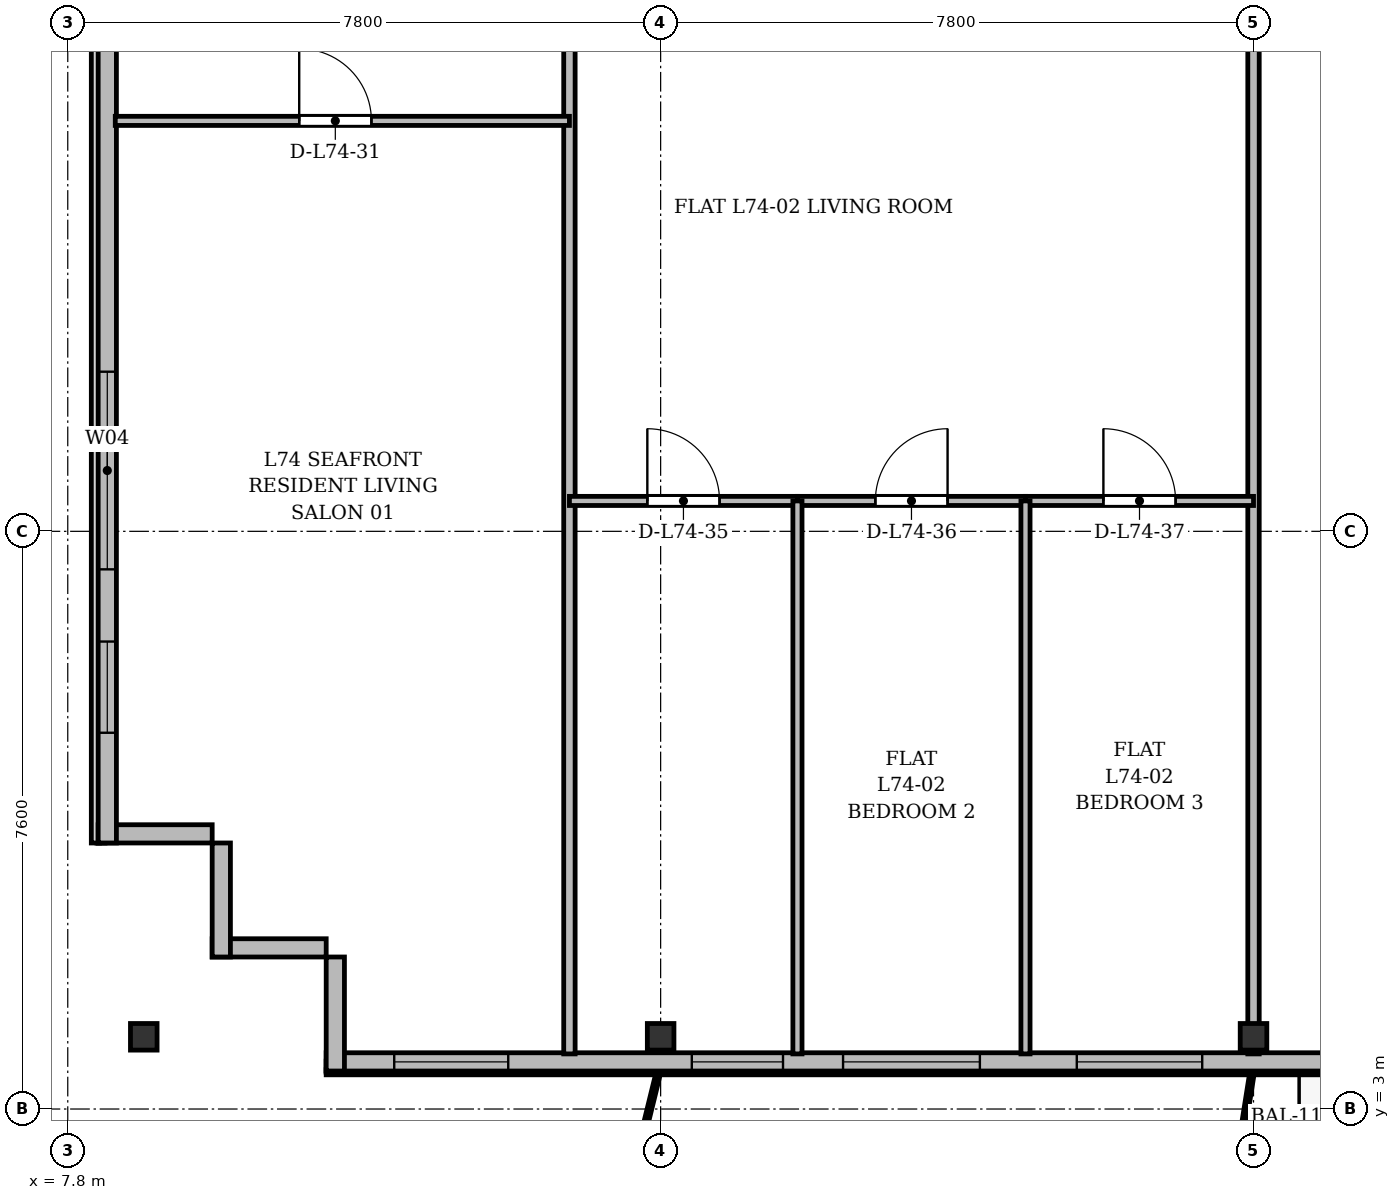
"""IFC4 building model, lengths in metres.
Left out: names, types, materials, properties, quantities, classifications, styles, units other than length and angle.
Written with IfcOpenShell. Run it as: python <this file> out.ifc"""

import sys

from ifc_helpers import new_model, si_unit, direction, frame, frame_2d, origin, origin_2d, place, context, subcontext, project, spatial, rectangle, i_section, extrude, source, transform, mapped, element, fill, save


model = new_model("IFC4")
c1 = context("Model", 3, precision=1e-05, world=origin(), true_north=direction((0.0, 1.0)))
c2 = subcontext(c1, "Body", "Model", "MODEL_VIEW")
j1 = project(units=[si_unit("LENGTHUNIT", "METRE"), si_unit("PLANEANGLEUNIT", "RADIAN")], contexts=[c1])
p1 = place(None, origin())
s1 = spatial("IfcSite", under=j1, at=p1, CompositionType="ELEMENT")
p2 = place(p1, origin())
s2 = spatial("IfcBuilding", under=s1, at=p2, CompositionType="ELEMENT")
p3 = place(p2, frame((0.0, 0.0, 284.7)))
s3 = spatial("IfcBuildingStorey", under=s2, at=p3, CompositionType="ELEMENT", Elevation=284.7)
m1 = source(origin(), c2, "Body", "SweptSolid", [
    extrude(i_section(OverallWidth=0.35, OverallDepth=0.35, WebThickness=0.018, FlangeThickness=0.028, at=origin_2d()), origin(), (0.0, 0.0, 1.0), 3.6),
])
for number, where, z_axis, x_axis in (
    (1, (8.8, 3.95, 0.0), (0.0, 0.0, 1.0), (1.0, 0.0, 0.0)),
    (2, (15.6, 3.95, 0.0), (0.0, 0.0, 1.0), (1.0, 0.0, 0.0)),
    (3, (23.4, 3.95, 0.0), (0.0, 0.0, 1.0), (1.0, 0.0, 0.0)),
):
    element("IfcColumn", number, at=place(p3, frame(where, z_axis=z_axis, x_axis=x_axis)), inside=s3, PredefinedType="COLUMN", context=c2, shape_type="MappedRepresentation", body=[
        mapped(m1, transform((0.0, 0.0, 0.0), x_axis=(1.0, 0.0, 0.0), y_axis=(0.0, 1.0, 0.0), z_axis=(0.0, 0.0, 1.0), scale=1.0)),
    ])
for number, where, z_axis, x_axis in (
    (4, (11.2, 5.12, 0.0), (0.0, 0.0, 1.0), (-1.0, 0.0, 0.0)),
    (5, (9.82, 5.0, 0.0), (0.0, 0.0, 1.0), (0.0, 1.0, 0.0)),
):
    element("IfcWall", number, at=place(p3, frame(where, z_axis=z_axis, x_axis=x_axis)), inside=s3, PredefinedType="SOLIDWALL", context=c2, shape_type="SweptSolid", body=[
        extrude(rectangle(XDim=1.5, YDim=0.24, at=frame_2d((0.75, 0.0))), origin(), (0.0, 0.0, 1.0), 3.37),
    ])
p4 = place(p3, frame((9.7, 6.62, 0.0), z_axis=(0.0, 0.0, 1.0), x_axis=(-1.0, 0.0, 0.0)))
e6 = element("IfcWall", 6, at=p4, inside=s3, PredefinedType="SOLIDWALL", context=c2, shape_type="SweptSolid", body=[
    extrude(rectangle(XDim=1.5, YDim=0.24, at=frame_2d((0.75, 0.0))), origin(), (0.0, 0.0, 1.0), 2.87),
])
p5 = place(p3, frame((8.32, 6.5, 0.0), z_axis=(0.0, 0.0, 1.0), x_axis=(0.0, 1.0, 0.0)))
e7 = element("IfcWall", 7, at=p5, inside=s3, PredefinedType="SOLIDWALL", context=c2, shape_type="SweptSolid", body=[
    extrude(rectangle(XDim=39.0, YDim=0.24, at=frame_2d((19.5, 0.0))), origin(), (0.0, 0.0, 1.0), 3.37),
])
p6 = place(p5, frame((1.45, 0.0, 0.92)))
e8 = element("IfcOpeningElement", 8, at=p6, cuts=e7, PredefinedType="OPENING", context=c2, shape_type="SweptSolid", body=[
    extrude(rectangle(XDim=1.2, YDim=1.65, at=frame_2d((0.6, 0.825))), frame((0.0, 0.13, 0.0), z_axis=(0.0, -1.0, 0.0), x_axis=(1.0, 0.0, 0.0)), (0.0, 0.0, 1.0), 0.26),
])
p7 = place(p5, frame((3.6, 0.0, 0.92)))
e9 = element("IfcOpeningElement", 9, at=p7, cuts=e7, PredefinedType="OPENING", context=c2, shape_type="SweptSolid", body=[
    extrude(rectangle(XDim=2.6, YDim=1.9, at=frame_2d((1.3, 0.95))), frame((0.0, 0.13, 0.0), z_axis=(0.0, -1.0, 0.0), x_axis=(1.0, 0.0, 0.0)), (0.0, 0.0, 1.0), 0.26),
])
p8 = place(p5, frame((15.0, 0.0, 0.92)))
e10 = element("IfcOpeningElement", 10, at=p8, cuts=e7, PredefinedType="OPENING", context=c2, shape_type="SweptSolid", body=[
    extrude(rectangle(XDim=2.6, YDim=1.9, at=frame_2d((1.3, 0.95))), frame((0.0, 0.13, 0.0), z_axis=(0.0, -1.0, 0.0), x_axis=(1.0, 0.0, 0.0)), (0.0, 0.0, 1.0), 0.26),
])
p9 = place(p5, frame((29.0, 0.0, 0.92)))
e11 = element("IfcOpeningElement", 11, at=p9, cuts=e7, PredefinedType="OPENING", context=c2, shape_type="SweptSolid", body=[
    extrude(rectangle(XDim=2.6, YDim=1.9, at=frame_2d((1.3, 0.95))), frame((0.0, 0.13, 0.0), z_axis=(0.0, -1.0, 0.0), x_axis=(1.0, 0.0, 0.0)), (0.0, 0.0, 1.0), 0.26),
])
p10 = place(p5, frame((36.65, 0.0, 0.92)))
e12 = element("IfcOpeningElement", 12, at=p10, cuts=e7, PredefinedType="OPENING", context=c2, shape_type="SweptSolid", body=[
    extrude(rectangle(XDim=1.2, YDim=1.65, at=frame_2d((0.6, 0.825))), frame((0.0, 0.13, 0.0), z_axis=(0.0, -1.0, 0.0), x_axis=(1.0, 0.0, 0.0)), (0.0, 0.0, 1.0), 0.26),
])
p11 = place(p3, frame((63.2, 3.62, 0.0), z_axis=(0.0, 0.0, 1.0), x_axis=(-1.0, 0.0, 0.0)))
e13 = element("IfcWall", 13, at=p11, inside=s3, PredefinedType="SOLIDWALL", context=c2, shape_type="SweptSolid", body=[
    extrude(rectangle(XDim=52.0, YDim=0.24, at=frame_2d((26.0, 0.0))), origin(), (0.0, 0.0, 1.0), 3.37),
])
p12 = place(p11, frame((0.92, 0.0, 0.9)))
e14 = element("IfcOpeningElement", 14, at=p12, cuts=e13, PredefinedType="OPENING", context=c2, shape_type="SweptSolid", body=[
    extrude(rectangle(XDim=1.65, YDim=1.85, at=frame_2d((0.825, 0.925))), frame((0.0, 0.13, 0.0), z_axis=(0.0, -1.0, 0.0), x_axis=(1.0, 0.0, 0.0)), (0.0, 0.0, 1.0), 0.26),
])
p13 = place(p11, frame((4.793, 0.0, 0.9)))
e15 = element("IfcOpeningElement", 15, at=p13, cuts=e13, PredefinedType="OPENING", context=c2, shape_type="SweptSolid", body=[
    extrude(rectangle(XDim=1.35, YDim=1.5, at=frame_2d((0.675, 0.75))), frame((0.0, 0.13, 0.0), z_axis=(0.0, -1.0, 0.0), x_axis=(1.0, 0.0, 0.0)), (0.0, 0.0, 1.0), 0.26),
])
p14 = place(p11, frame((6.685, 0.0, 0.0)))
e16 = element("IfcOpeningElement", 16, at=p14, cuts=e13, PredefinedType="OPENING", context=c2, shape_type="SweptSolid", body=[
    extrude(rectangle(XDim=1.2, YDim=2.2, at=frame_2d((0.6, 1.1))), frame((0.0, 0.13, 0.0), z_axis=(0.0, -1.0, 0.0), x_axis=(1.0, 0.0, 0.0)), (0.0, 0.0, 1.0), 0.26),
])
p15 = place(p11, frame((9.983, 0.0, 0.9)))
e17 = element("IfcOpeningElement", 17, at=p15, cuts=e13, PredefinedType="OPENING", context=c2, shape_type="SweptSolid", body=[
    extrude(rectangle(XDim=1.5, YDim=1.75, at=frame_2d((0.75, 0.875))), frame((0.0, 0.13, 0.0), z_axis=(0.0, -1.0, 0.0), x_axis=(1.0, 0.0, 0.0)), (0.0, 0.0, 1.0), 0.26),
])
p16 = place(p11, frame((13.2, 0.0, 0.9)))
e18 = element("IfcOpeningElement", 18, at=p16, cuts=e13, PredefinedType="OPENING", context=c2, shape_type="SweptSolid", body=[
    extrude(rectangle(XDim=2.0, YDim=1.95, at=frame_2d((1.0, 0.975))), frame((0.0, 0.13, 0.0), z_axis=(0.0, -1.0, 0.0), x_axis=(1.0, 0.0, 0.0)), (0.0, 0.0, 1.0), 0.26),
])
p17 = place(p11, frame((16.975, 0.0, 0.9)))
e19 = element("IfcOpeningElement", 19, at=p17, cuts=e13, PredefinedType="OPENING", context=c2, shape_type="SweptSolid", body=[
    extrude(rectangle(XDim=1.65, YDim=1.85, at=frame_2d((0.825, 0.925))), frame((0.0, 0.13, 0.0), z_axis=(0.0, -1.0, 0.0), x_axis=(1.0, 0.0, 0.0)), (0.0, 0.0, 1.0), 0.26),
])
p18 = place(p11, frame((21.3, 0.0, 0.9)))
e20 = element("IfcOpeningElement", 20, at=p18, cuts=e13, PredefinedType="OPENING", context=c2, shape_type="SweptSolid", body=[
    extrude(rectangle(XDim=1.8, YDim=1.8, at=frame_2d((0.9, 0.9))), frame((0.0, 0.13, 0.0), z_axis=(0.0, -1.0, 0.0), x_axis=(1.0, 0.0, 0.0)), (0.0, 0.0, 1.0), 0.26),
])
p19 = place(p11, frame((27.7, 0.0, 0.9)))
e21 = element("IfcOpeningElement", 21, at=p19, cuts=e13, PredefinedType="OPENING", context=c2, shape_type="SweptSolid", body=[
    extrude(rectangle(XDim=2.2, YDim=1.8, at=frame_2d((1.1, 0.9))), frame((0.0, 0.13, 0.0), z_axis=(0.0, -1.0, 0.0), x_axis=(1.0, 0.0, 0.0)), (0.0, 0.0, 1.0), 0.26),
])
p20 = place(p11, frame((33.873, 0.0, 0.0)))
e22 = element("IfcOpeningElement", 22, at=p20, cuts=e13, PredefinedType="OPENING", context=c2, shape_type="SweptSolid", body=[
    extrude(rectangle(XDim=1.2, YDim=2.2, at=frame_2d((0.6, 1.1))), frame((0.0, 0.13, 0.0), z_axis=(0.0, -1.0, 0.0), x_axis=(1.0, 0.0, 0.0)), (0.0, 0.0, 1.0), 0.26),
])
p21 = place(p11, frame((36.8, 0.0, 0.9)))
e23 = element("IfcOpeningElement", 23, at=p21, cuts=e13, PredefinedType="OPENING", context=c2, shape_type="SweptSolid", body=[
    extrude(rectangle(XDim=2.0, YDim=1.95, at=frame_2d((1.0, 0.975))), frame((0.0, 0.13, 0.0), z_axis=(0.0, -1.0, 0.0), x_axis=(1.0, 0.0, 0.0)), (0.0, 0.0, 1.0), 0.26),
])
p22 = place(p11, frame((40.475, 0.0, 0.9)))
e24 = element("IfcOpeningElement", 24, at=p22, cuts=e13, PredefinedType="OPENING", context=c2, shape_type="SweptSolid", body=[
    extrude(rectangle(XDim=1.65, YDim=1.85, at=frame_2d((0.825, 0.925))), frame((0.0, 0.13, 0.0), z_axis=(0.0, -1.0, 0.0), x_axis=(1.0, 0.0, 0.0)), (0.0, 0.0, 1.0), 0.26),
])
p23 = place(p11, frame((43.4, 0.0, 0.9)))
e25 = element("IfcOpeningElement", 25, at=p23, cuts=e13, PredefinedType="OPENING", context=c2, shape_type="SweptSolid", body=[
    extrude(rectangle(XDim=1.8, YDim=1.8, at=frame_2d((0.9, 0.9))), frame((0.0, 0.13, 0.0), z_axis=(0.0, -1.0, 0.0), x_axis=(1.0, 0.0, 0.0)), (0.0, 0.0, 1.0), 0.26),
])
p24 = place(p11, frame((45.99, 0.0, 0.9)))
e26 = element("IfcOpeningElement", 26, at=p24, cuts=e13, PredefinedType="OPENING", context=c2, shape_type="SweptSolid", body=[
    extrude(rectangle(XDim=1.2, YDim=1.65, at=frame_2d((0.6, 0.825))), frame((0.0, 0.13, 0.0), z_axis=(0.0, -1.0, 0.0), x_axis=(1.0, 0.0, 0.0)), (0.0, 0.0, 1.0), 0.26),
])
p25 = place(p11, frame((49.605, 0.0, 0.9)))
e27 = element("IfcOpeningElement", 27, at=p25, cuts=e13, PredefinedType="OPENING", context=c2, shape_type="SweptSolid", body=[
    extrude(rectangle(XDim=1.5, YDim=1.75, at=frame_2d((0.75, 0.875))), frame((0.0, 0.13, 0.0), z_axis=(0.0, -1.0, 0.0), x_axis=(1.0, 0.0, 0.0)), (0.0, 0.0, 1.0), 0.26),
])
p26 = place(p3, frame((11.32, 3.5, 0.0), z_axis=(0.0, 0.0, 1.0), x_axis=(0.0, 1.0, 0.0)))
e28 = element("IfcWall", 28, at=p26, inside=s3, PredefinedType="SOLIDWALL", context=c2, shape_type="SweptSolid", body=[
    extrude(rectangle(XDim=1.5, YDim=0.24, at=frame_2d((0.75, 0.0))), origin(), (0.0, 0.0, 1.0), 2.92),
])
p27 = place(p3, frame((14.4, 3.725, 0.0), z_axis=(0.0, 0.0, 1.0), x_axis=(0.0, 1.0, 0.0)))
e29 = element("IfcWall", 29, at=p27, inside=s3, PredefinedType="PARTITIONING", context=c2, shape_type="SweptSolid", body=[
    extrude(rectangle(XDim=27.275, YDim=0.15, at=frame_2d((13.637, 0.0))), origin(), (0.0, 0.0, 1.0), 2.92),
])
p28 = place(p3, frame((23.4, 3.725, 0.0), z_axis=(0.0, 0.0, 1.0), x_axis=(0.0, 1.0, 0.0)))
e30 = element("IfcWall", 30, at=p28, inside=s3, PredefinedType="PARTITIONING", context=c2, shape_type="SweptSolid", body=[
    extrude(rectangle(XDim=27.275, YDim=0.15, at=frame_2d((13.637, 0.0))), origin(), (0.0, 0.0, 1.0), 2.87),
])
p29 = place(p3, frame((8.425, 16.0, 0.0), z_axis=(0.0, 0.0, 1.0), x_axis=(1.0, 0.0, 0.0)))
e31 = element("IfcWall", 31, at=p29, inside=s3, PredefinedType="PARTITIONING", context=c2, shape_type="SweptSolid", body=[
    extrude(rectangle(XDim=5.975, YDim=0.12, at=frame_2d((2.987, 0.0))), origin(), (0.0, 0.0, 1.0), 2.87),
])
p30 = place(p29, frame((2.42, 0.0, 0.0)))
e32 = element("IfcOpeningElement", 32, at=p30, cuts=e31, PredefinedType="OPENING", context=c2, shape_type="SweptSolid", body=[
    extrude(rectangle(XDim=0.95, YDim=2.15, at=frame_2d((0.475, 1.075))), frame((0.0, 0.07, 0.0), z_axis=(0.0, -1.0, 0.0), x_axis=(1.0, 0.0, 0.0)), (0.0, 0.0, 1.0), 0.14),
])
p31 = place(p3, frame((14.4, 11.0, 0.0), z_axis=(0.0, 0.0, 1.0), x_axis=(1.0, 0.0, 0.0)))
e33 = element("IfcWall", 33, at=p31, inside=s3, PredefinedType="PARTITIONING", context=c2, shape_type="SweptSolid", body=[
    extrude(rectangle(XDim=3.0, YDim=0.12, at=frame_2d((1.5, 0.0))), origin(), (0.0, 0.0, 1.0), 2.87),
])
p32 = place(p31, frame((1.025, 0.0, 0.0)))
e34 = element("IfcOpeningElement", 34, at=p32, cuts=e33, PredefinedType="OPENING", context=c2, shape_type="SweptSolid", body=[
    extrude(rectangle(XDim=0.95, YDim=2.15, at=frame_2d((0.475, 1.075))), frame((0.0, 0.07, 0.0), z_axis=(0.0, -1.0, 0.0), x_axis=(1.0, 0.0, 0.0)), (0.0, 0.0, 1.0), 0.14),
])
p33 = place(p3, frame((17.4, 11.0, 0.0), z_axis=(0.0, 0.0, 1.0), x_axis=(1.0, 0.0, 0.0)))
e35 = element("IfcWall", 35, at=p33, inside=s3, PredefinedType="PARTITIONING", context=c2, shape_type="SweptSolid", body=[
    extrude(rectangle(XDim=3.0, YDim=0.12, at=frame_2d((1.5, 0.0))), origin(), (0.0, 0.0, 1.0), 3.37),
])
p34 = place(p33, frame((1.025, 0.0, 0.0)))
e36 = element("IfcOpeningElement", 36, at=p34, cuts=e35, PredefinedType="OPENING", context=c2, shape_type="SweptSolid", body=[
    extrude(rectangle(XDim=0.95, YDim=2.15, at=frame_2d((0.475, 1.075))), frame((0.0, 0.07, 0.0), z_axis=(0.0, -1.0, 0.0), x_axis=(1.0, 0.0, 0.0)), (0.0, 0.0, 1.0), 0.14),
])
p35 = place(p3, frame((17.4, 3.725, 0.0), z_axis=(0.0, 0.0, 1.0), x_axis=(0.0, 1.0, 0.0)))
e37 = element("IfcWall", 37, at=p35, inside=s3, PredefinedType="PARTITIONING", context=c2, shape_type="SweptSolid", body=[
    extrude(rectangle(XDim=7.275, YDim=0.12, at=frame_2d((3.637, 0.0))), origin(), (0.0, 0.0, 1.0), 2.92),
])
p36 = place(p3, frame((20.4, 11.0, 0.0), z_axis=(0.0, 0.0, 1.0), x_axis=(1.0, 0.0, 0.0)))
e38 = element("IfcWall", 38, at=p36, inside=s3, PredefinedType="PARTITIONING", context=c2, shape_type="SweptSolid", body=[
    extrude(rectangle(XDim=3.0, YDim=0.12, at=frame_2d((1.5, 0.0))), origin(), (0.0, 0.0, 1.0), 2.87),
])
p37 = place(p36, frame((1.025, 0.0, 0.0)))
e39 = element("IfcOpeningElement", 39, at=p37, cuts=e38, PredefinedType="OPENING", context=c2, shape_type="SweptSolid", body=[
    extrude(rectangle(XDim=0.95, YDim=2.15, at=frame_2d((0.475, 1.075))), frame((0.0, 0.07, 0.0), z_axis=(0.0, -1.0, 0.0), x_axis=(1.0, 0.0, 0.0)), (0.0, 0.0, 1.0), 0.14),
])
p38 = place(p3, frame((20.4, 3.725, 0.0), z_axis=(0.0, 0.0, 1.0), x_axis=(0.0, 1.0, 0.0)))
e40 = element("IfcWall", 40, at=p38, inside=s3, PredefinedType="PARTITIONING", context=c2, shape_type="SweptSolid", body=[
    extrude(rectangle(XDim=7.275, YDim=0.12, at=frame_2d((3.637, 0.0))), origin(), (0.0, 0.0, 1.0), 2.92),
])
m2 = source(origin(), c2, "Body", "SweptSolid", [
    extrude(rectangle(XDim=1.2, YDim=1.65, at=frame_2d((0.6, 0.825))), frame((0.0, 0.03, 0.0), z_axis=(0.0, -1.0, 0.0), x_axis=(1.0, 0.0, 0.0)), (0.0, 0.0, 1.0), 0.06),
])
p39 = place(p6, origin())
e41 = element("IfcWindow", 41, at=p39, inside=s3, PartitioningType="SINGLE_PANEL", PredefinedType="WINDOW", context=c2, shape_type="MappedRepresentation", body=[
    mapped(m2, transform((0.0, 0.0, 0.0), x_axis=(1.0, 0.0, 0.0), y_axis=(0.0, 1.0, 0.0), z_axis=(0.0, 0.0, 1.0), scale=1.0)),
])
fill(e8, e41)
m3 = source(origin(), c2, "Body", "SweptSolid", [
    extrude(rectangle(XDim=2.6, YDim=1.9, at=frame_2d((1.3, 0.95))), frame((0.0, 0.03, 0.0), z_axis=(0.0, -1.0, 0.0), x_axis=(1.0, 0.0, 0.0)), (0.0, 0.0, 1.0), 0.06),
])
p40 = place(p7, origin())
e42 = element("IfcWindow", 42, at=p40, inside=s3, PartitioningType="SINGLE_PANEL", PredefinedType="WINDOW", context=c2, shape_type="MappedRepresentation", body=[
    mapped(m3, transform((0.0, 0.0, 0.0), x_axis=(1.0, 0.0, 0.0), y_axis=(0.0, 1.0, 0.0), z_axis=(0.0, 0.0, 1.0), scale=1.0)),
])
fill(e9, e42)
m4 = source(origin(), c2, "Body", "SweptSolid", [
    extrude(rectangle(XDim=1.65, YDim=1.85, at=frame_2d((0.825, 0.925))), frame((0.0, 0.03, 0.0), z_axis=(0.0, -1.0, 0.0), x_axis=(1.0, 0.0, 0.0)), (0.0, 0.0, 1.0), 0.06),
])
p41 = place(p22, origin())
e43 = element("IfcWindow", 43, at=p41, inside=s3, PartitioningType="SINGLE_PANEL", PredefinedType="WINDOW", context=c2, shape_type="MappedRepresentation", body=[
    mapped(m4, transform((0.0, 0.0, 0.0), x_axis=(1.0, 0.0, 0.0), y_axis=(0.0, 1.0, 0.0), z_axis=(0.0, 0.0, 1.0), scale=1.0)),
])
fill(e24, e43)
m5 = source(origin(), c2, "Body", "SweptSolid", [
    extrude(rectangle(XDim=1.8, YDim=1.8, at=frame_2d((0.9, 0.9))), frame((0.0, 0.03, 0.0), z_axis=(0.0, -1.0, 0.0), x_axis=(1.0, 0.0, 0.0)), (0.0, 0.0, 1.0), 0.06),
])
p42 = place(p23, origin())
e44 = element("IfcWindow", 44, at=p42, inside=s3, PartitioningType="SINGLE_PANEL", PredefinedType="WINDOW", context=c2, shape_type="MappedRepresentation", body=[
    mapped(m5, transform((0.0, 0.0, 0.0), x_axis=(1.0, 0.0, 0.0), y_axis=(0.0, 1.0, 0.0), z_axis=(0.0, 0.0, 1.0), scale=1.0)),
])
fill(e25, e44)
p43 = place(p24, origin())
e45 = element("IfcWindow", 45, at=p43, inside=s3, PartitioningType="SINGLE_PANEL", PredefinedType="WINDOW", context=c2, shape_type="MappedRepresentation", body=[
    mapped(m2, transform((0.0, 0.0, 0.0), x_axis=(1.0, 0.0, 0.0), y_axis=(0.0, 1.0, 0.0), z_axis=(0.0, 0.0, 1.0), scale=1.0)),
])
fill(e26, e45)
m6 = source(origin(), c2, "Body", "SweptSolid", [
    extrude(rectangle(XDim=1.5, YDim=1.75, at=frame_2d((0.75, 0.875))), frame((0.0, 0.03, 0.0), z_axis=(0.0, -1.0, 0.0), x_axis=(1.0, 0.0, 0.0)), (0.0, 0.0, 1.0), 0.06),
])
p44 = place(p25, origin())
e46 = element("IfcWindow", 46, at=p44, inside=s3, PartitioningType="SINGLE_PANEL", PredefinedType="WINDOW", context=c2, shape_type="MappedRepresentation", body=[
    mapped(m6, transform((0.0, 0.0, 0.0), x_axis=(1.0, 0.0, 0.0), y_axis=(0.0, 1.0, 0.0), z_axis=(0.0, 0.0, 1.0), scale=1.0)),
])
fill(e27, e46)
m7 = source(origin(), c2, "Body", "SweptSolid", [
    extrude(rectangle(XDim=0.95, YDim=2.15, at=frame_2d((0.475, 1.075))), frame((0.0, 0.025, 0.0), z_axis=(0.0, -1.0, 0.0), x_axis=(1.0, 0.0, 0.0)), (0.0, 0.0, 1.0), 0.05),
])
p45 = place(p30, origin())
e47 = element("IfcDoor", 47, at=p45, inside=s3, OperationType="SINGLE_SWING_LEFT", PredefinedType="DOOR", context=c2, shape_type="MappedRepresentation", body=[
    mapped(m7, transform((0.0, 0.0, 0.0), x_axis=(1.0, 0.0, 0.0), y_axis=(0.0, 1.0, 0.0), z_axis=(0.0, 0.0, 1.0), scale=1.0)),
])
fill(e32, e47)
p46 = place(p32, origin())
e48 = element("IfcDoor", 48, at=p46, inside=s3, OperationType="SINGLE_SWING_LEFT", PredefinedType="DOOR", context=c2, shape_type="MappedRepresentation", body=[
    mapped(m7, transform((0.0, 0.0, 0.0), x_axis=(1.0, 0.0, 0.0), y_axis=(0.0, 1.0, 0.0), z_axis=(0.0, 0.0, 1.0), scale=1.0)),
])
fill(e34, e48)
p47 = place(p34, origin())
e49 = element("IfcDoor", 49, at=p47, inside=s3, OperationType="SINGLE_SWING_RIGHT", PredefinedType="DOOR", context=c2, shape_type="MappedRepresentation", body=[
    mapped(m7, transform((0.0, 0.0, 0.0), x_axis=(1.0, 0.0, 0.0), y_axis=(0.0, 1.0, 0.0), z_axis=(0.0, 0.0, 1.0), scale=1.0)),
])
fill(e36, e49)
p48 = place(p37, origin())
e50 = element("IfcDoor", 50, at=p48, inside=s3, OperationType="SINGLE_SWING_LEFT", PredefinedType="DOOR", context=c2, shape_type="MappedRepresentation", body=[
    mapped(m7, transform((0.0, 0.0, 0.0), x_axis=(1.0, 0.0, 0.0), y_axis=(0.0, 1.0, 0.0), z_axis=(0.0, 0.0, 1.0), scale=1.0)),
])
fill(e39, e50)
save(model, sys.argv[1])
